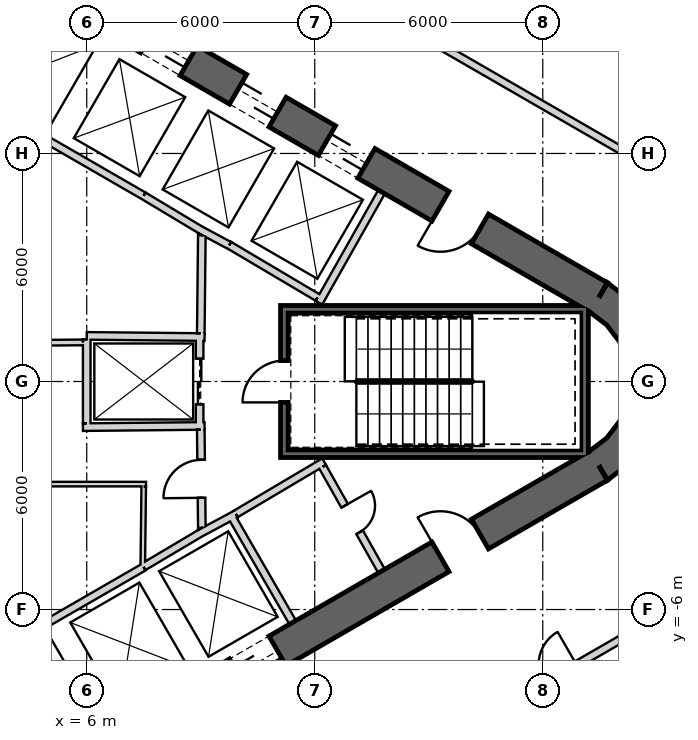
"""IFC4 building model, lengths in metres.
Left out: names, types, materials, properties, quantities, classifications, styles, units other than length and angle.
Written with IfcOpenShell. Run it as: python <this file> out.ifc"""

import sys

from ifc_helpers import new_model, si_unit, direction, frame, frame_2d, origin, place, context, subcontext, project, spatial, polyline, rectangle, outline, extrude, element, fill, save


model = new_model("IFC4")
c1 = context("Model", 3, precision=1e-05, world=origin(), true_north=direction((0.0, 1.0)))
c2 = subcontext(c1, "Body", "Model", "MODEL_VIEW")
j1 = project(units=[si_unit("LENGTHUNIT", "METRE"), si_unit("PLANEANGLEUNIT", "RADIAN")], contexts=[c1])
p1 = place(None, origin())
s1 = spatial("IfcSite", under=j1, at=p1, CompositionType="ELEMENT")
p2 = place(p1, origin())
s2 = spatial("IfcBuilding", under=s1, at=p2, CompositionType="ELEMENT")
p3 = place(p2, frame((0.0, 0.0, 82.4)))
s3 = spatial("IfcBuildingStorey", under=s2, at=p3, CompositionType="ELEMENT", Elevation=82.4)
p4 = place(p3, frame((19.475, 2.208, 0.0), z_axis=(0.0, 0.0, 1.0), x_axis=(-0.866028369851, 0.499994862586, 0.0)))
e1 = element("IfcWall", 1, at=p4, inside=s3, PredefinedType="SHEAR", context=c2, shape_type="SweptSolid", body=[
    extrude(rectangle(XDim=31.523, YDim=0.9, at=frame_2d((15.762, 0.0))), origin(), (0.0, 0.0, 1.0), 4.1),
])
p5 = place(p4, frame((7.062, 0.0, 0.0)))
e2 = element("IfcOpeningElement", 2, at=p5, cuts=e1, PredefinedType="OPENING", context=c2, shape_type="SweptSolid", body=[
    extrude(rectangle(XDim=1.2, YDim=2.4, at=frame_2d((0.6, 1.2))), frame((0.0, 0.46, 0.0), z_axis=(0.0, -1.0, 0.0), x_axis=(1.0, 0.0, 0.0)), (0.0, 0.0, 1.0), 0.92),
])
p6 = place(p4, frame((9.762, 0.0, 0.0)))
e3 = element("IfcOpeningElement", 3, at=p6, cuts=e1, PredefinedType="OPENING", context=c2, shape_type="SweptSolid", body=[
    extrude(rectangle(XDim=1.2, YDim=2.4, at=frame_2d((0.6, 1.2))), frame((0.0, 0.46, 0.0), z_axis=(0.0, -1.0, 0.0), x_axis=(1.0, 0.0, 0.0)), (0.0, 0.0, 1.0), 0.92),
])
p7 = place(p4, frame((12.462, 0.0, 0.0)))
e4 = element("IfcOpeningElement", 4, at=p7, cuts=e1, PredefinedType="OPENING", context=c2, shape_type="SweptSolid", body=[
    extrude(rectangle(XDim=1.2, YDim=2.4, at=frame_2d((0.6, 1.2))), frame((0.0, 0.46, 0.0), z_axis=(0.0, -1.0, 0.0), x_axis=(1.0, 0.0, 0.0)), (0.0, 0.0, 1.0), 0.92),
])
p8 = place(p4, frame((15.162, 0.0, 0.0)))
e5 = element("IfcOpeningElement", 5, at=p8, cuts=e1, PredefinedType="OPENING", context=c2, shape_type="SweptSolid", body=[
    extrude(rectangle(XDim=1.2, YDim=2.4, at=frame_2d((0.6, 1.2))), frame((0.0, 0.46, 0.0), z_axis=(0.0, -1.0, 0.0), x_axis=(1.0, 0.0, 0.0)), (0.0, 0.0, 1.0), 0.92),
])
p9 = place(p4, frame((17.862, 0.0, 0.0)))
e6 = element("IfcOpeningElement", 6, at=p9, cuts=e1, PredefinedType="OPENING", context=c2, shape_type="SweptSolid", body=[
    extrude(rectangle(XDim=1.2, YDim=2.4, at=frame_2d((0.6, 1.2))), frame((0.0, 0.46, 0.0), z_axis=(0.0, -1.0, 0.0), x_axis=(1.0, 0.0, 0.0)), (0.0, 0.0, 1.0), 0.92),
])
p10 = place(p4, frame((20.562, 0.0, 0.0)))
e7 = element("IfcOpeningElement", 7, at=p10, cuts=e1, PredefinedType="OPENING", context=c2, shape_type="SweptSolid", body=[
    extrude(rectangle(XDim=1.2, YDim=2.4, at=frame_2d((0.6, 1.2))), frame((0.0, 0.46, 0.0), z_axis=(0.0, -1.0, 0.0), x_axis=(1.0, 0.0, 0.0)), (0.0, 0.0, 1.0), 0.92),
])
p11 = place(p4, frame((23.262, 0.0, 0.0)))
e8 = element("IfcOpeningElement", 8, at=p11, cuts=e1, PredefinedType="OPENING", context=c2, shape_type="SweptSolid", body=[
    extrude(rectangle(XDim=1.2, YDim=2.4, at=frame_2d((0.6, 1.2))), frame((0.0, 0.46, 0.0), z_axis=(0.0, -1.0, 0.0), x_axis=(1.0, 0.0, 0.0)), (0.0, 0.0, 1.0), 0.92),
])
p12 = place(p4, frame((3.612, 0.0, 0.0)))
e9 = element("IfcOpeningElement", 9, at=p12, cuts=e1, PredefinedType="OPENING", context=c2, shape_type="SweptSolid", body=[
    extrude(rectangle(XDim=1.2, YDim=2.4, at=frame_2d((0.6, 1.2))), frame((0.0, 0.46, 0.0), z_axis=(0.0, -1.0, 0.0), x_axis=(1.0, 0.0, 0.0)), (0.0, 0.0, 1.0), 0.92),
])
p13 = place(p4, frame((26.712, 0.0, 0.0)))
e10 = element("IfcOpeningElement", 10, at=p13, cuts=e1, PredefinedType="OPENING", context=c2, shape_type="SweptSolid", body=[
    extrude(rectangle(XDim=1.2, YDim=2.4, at=frame_2d((0.6, 1.2))), frame((0.0, 0.46, 0.0), z_axis=(0.0, -1.0, 0.0), x_axis=(1.0, 0.0, 0.0)), (0.0, 0.0, 1.0), 0.92),
])
p14 = place(p3, frame((-7.825, -17.97, 0.0), z_axis=(0.0, 0.0, 1.0), x_axis=(0.866028369851, 0.499994862586, 0.0)))
e11 = element("IfcWall", 11, at=p14, inside=s3, PredefinedType="SHEAR", context=c2, shape_type="SweptSolid", body=[
    extrude(rectangle(XDim=31.523, YDim=0.9, at=frame_2d((15.762, 0.0))), origin(), (0.0, 0.0, 1.0), 4.1),
])
p15 = place(p14, frame((7.062, 0.0, 0.0)))
e12 = element("IfcOpeningElement", 12, at=p15, cuts=e11, PredefinedType="OPENING", context=c2, shape_type="SweptSolid", body=[
    extrude(rectangle(XDim=1.2, YDim=2.4, at=frame_2d((0.6, 1.2))), frame((0.0, 0.46, 0.0), z_axis=(0.0, -1.0, 0.0), x_axis=(1.0, 0.0, 0.0)), (0.0, 0.0, 1.0), 0.92),
])
p16 = place(p14, frame((9.762, 0.0, 0.0)))
e13 = element("IfcOpeningElement", 13, at=p16, cuts=e11, PredefinedType="OPENING", context=c2, shape_type="SweptSolid", body=[
    extrude(rectangle(XDim=1.2, YDim=2.4, at=frame_2d((0.6, 1.2))), frame((0.0, 0.46, 0.0), z_axis=(0.0, -1.0, 0.0), x_axis=(1.0, 0.0, 0.0)), (0.0, 0.0, 1.0), 0.92),
])
p17 = place(p14, frame((12.462, 0.0, 0.0)))
e14 = element("IfcOpeningElement", 14, at=p17, cuts=e11, PredefinedType="OPENING", context=c2, shape_type="SweptSolid", body=[
    extrude(rectangle(XDim=1.2, YDim=2.4, at=frame_2d((0.6, 1.2))), frame((0.0, 0.46, 0.0), z_axis=(0.0, -1.0, 0.0), x_axis=(1.0, 0.0, 0.0)), (0.0, 0.0, 1.0), 0.92),
])
p18 = place(p14, frame((15.162, 0.0, 0.0)))
e15 = element("IfcOpeningElement", 15, at=p18, cuts=e11, PredefinedType="OPENING", context=c2, shape_type="SweptSolid", body=[
    extrude(rectangle(XDim=1.2, YDim=2.4, at=frame_2d((0.6, 1.2))), frame((0.0, 0.46, 0.0), z_axis=(0.0, -1.0, 0.0), x_axis=(1.0, 0.0, 0.0)), (0.0, 0.0, 1.0), 0.92),
])
p19 = place(p14, frame((17.862, 0.0, 0.0)))
e16 = element("IfcOpeningElement", 16, at=p19, cuts=e11, PredefinedType="OPENING", context=c2, shape_type="SweptSolid", body=[
    extrude(rectangle(XDim=1.2, YDim=2.4, at=frame_2d((0.6, 1.2))), frame((0.0, 0.46, 0.0), z_axis=(0.0, -1.0, 0.0), x_axis=(1.0, 0.0, 0.0)), (0.0, 0.0, 1.0), 0.92),
])
p20 = place(p14, frame((20.562, 0.0, 0.0)))
e17 = element("IfcOpeningElement", 17, at=p20, cuts=e11, PredefinedType="OPENING", context=c2, shape_type="SweptSolid", body=[
    extrude(rectangle(XDim=1.2, YDim=2.4, at=frame_2d((0.6, 1.2))), frame((0.0, 0.46, 0.0), z_axis=(0.0, -1.0, 0.0), x_axis=(1.0, 0.0, 0.0)), (0.0, 0.0, 1.0), 0.92),
])
p21 = place(p14, frame((26.712, 0.0, 0.0)))
e18 = element("IfcOpeningElement", 18, at=p21, cuts=e11, PredefinedType="OPENING", context=c2, shape_type="SweptSolid", body=[
    extrude(rectangle(XDim=1.2, YDim=2.4, at=frame_2d((0.6, 1.2))), frame((0.0, 0.46, 0.0), z_axis=(0.0, -1.0, 0.0), x_axis=(1.0, 0.0, 0.0)), (0.0, 0.0, 1.0), 0.92),
])
p22 = place(p14, frame((3.612, 0.0, 0.0)))
e19 = element("IfcOpeningElement", 19, at=p22, cuts=e11, PredefinedType="OPENING", context=c2, shape_type="SweptSolid", body=[
    extrude(rectangle(XDim=1.2, YDim=2.4, at=frame_2d((0.6, 1.2))), frame((0.0, 0.46, 0.0), z_axis=(0.0, -1.0, 0.0), x_axis=(1.0, 0.0, 0.0)), (0.0, 0.0, 1.0), 0.92),
])
p23 = place(p3, origin())
e20 = element("IfcWall", 20, at=p23, inside=s3, PredefinedType="SHEAR", context=c2, shape_type="SweptSolid", body=[
    extrude(outline(polyline([(19.7, -2.598), (20.321, -2.121), (20.798, -1.5), (21.098, -0.777), (21.2, 0.0), (21.098, 0.777), (20.798, 1.5), (20.321, 2.121), (19.7, 2.598), (19.25, 1.819), (19.685, 1.485), (20.019, 1.05), (20.229, 0.543), (20.3, 0.0), (20.229, -0.543), (20.019, -1.05), (19.685, -1.485), (19.25, -1.819), (19.7, -2.598)])), origin(), (0.0, 0.0, 1.0), 4.1),
])
p24 = place(p3, frame((7.497, 4.886, 0.0), z_axis=(0.0, 0.0, 1.0), x_axis=(-0.866030989016, 0.499990325971, 0.0)))
e21 = element("IfcWall", 21, at=p24, inside=s3, PredefinedType="PLUMBINGWALL", context=c2, shape_type="SweptSolid", body=[
    extrude(rectangle(XDim=8.1, YDim=0.2, at=frame_2d((4.05, 0.0))), origin(), (0.0, 0.0, 1.0), 3.8),
])
p25 = place(p3, frame((12.11, 2.073, 0.0), z_axis=(0.0, 0.0, 1.0), x_axis=(0.49196600604, 0.870614408852, 0.0)))
e22 = element("IfcWall", 22, at=p25, inside=s3, PredefinedType="PLUMBINGWALL", context=c2, shape_type="SweptSolid", body=[
    extrude(rectangle(XDim=3.35, YDim=0.2, at=frame_2d((1.675, 0.0))), origin(), (0.0, 0.0, 1.0), 3.8),
])
p26 = place(p3, frame((12.073, 2.211, 0.0), z_axis=(0.0, 0.0, 1.0), x_axis=(-0.860438357912, 0.509554542943, 0.0)))
e23 = element("IfcWall", 23, at=p26, inside=s3, PredefinedType="PLUMBINGWALL", context=c2, shape_type="SweptSolid", body=[
    extrude(rectangle(XDim=2.7, YDim=0.2, at=frame_2d((1.35, 0.0))), origin(), (0.0, 0.0, 1.0), 3.8),
])
p27 = place(p3, frame((9.748, 3.583, 0.0), z_axis=(0.0, 0.0, 1.0), x_axis=(-0.880917147855, 0.473270513147, 0.0)))
e24 = element("IfcWall", 24, at=p27, inside=s3, PredefinedType="PLUMBINGWALL", context=c2, shape_type="SweptSolid", body=[
    extrude(rectangle(XDim=0.878, YDim=0.2, at=frame_2d((0.439, 0.0))), origin(), (0.0, 0.0, 1.0), 3.8),
])
p28 = place(p3, frame((9.079, 3.937, 0.0), z_axis=(0.0, 0.0, 1.0), x_axis=(-0.857516281273, 0.51445682749, 0.0)))
e25 = element("IfcWall", 25, at=p28, inside=s3, PredefinedType="PLUMBINGWALL", context=c2, shape_type="SweptSolid", body=[
    extrude(rectangle(XDim=1.845, YDim=0.2, at=frame_2d((0.922, 0.0))), origin(), (0.0, 0.0, 1.0), 3.8),
])
p29 = place(p3, frame((0.483, -8.936, 0.0), z_axis=(0.0, 0.0, 1.0), x_axis=(0.866030989016, 0.499990325971, 0.0)))
e26 = element("IfcWall", 26, at=p29, inside=s3, PredefinedType="PLUMBINGWALL", context=c2, shape_type="SweptSolid", body=[
    extrude(rectangle(XDim=8.1, YDim=0.2, at=frame_2d((4.05, 0.0))), origin(), (0.0, 0.0, 1.0), 3.8),
])
p30 = place(p3, frame((9.795, -3.525, 0.0), z_axis=(0.0, 0.0, 1.0), x_axis=(0.499984717929, -0.866034226713, 0.0)))
e27 = element("IfcWall", 27, at=p30, inside=s3, PredefinedType="PLUMBINGWALL", context=c2, shape_type="SweptSolid", body=[
    extrude(rectangle(XDim=3.25, YDim=0.2, at=frame_2d((1.625, 0.0))), origin(), (0.0, 0.0, 1.0), 3.8),
])
p31 = place(p3, frame((8.974, -3.999, 0.0), z_axis=(0.0, 0.0, 1.0), x_axis=(0.880907015104, 0.473289373154, 0.0)))
e28 = element("IfcWall", 28, at=p31, inside=s3, PredefinedType="PLUMBINGWALL", context=c2, shape_type="SweptSolid", body=[
    extrude(rectangle(XDim=1.078, YDim=0.2, at=frame_2d((0.539, 0.0))), origin(), (0.0, 0.0, 1.0), 3.8),
])
p32 = place(p3, frame((7.493, -4.878, 0.0), z_axis=(0.0, 0.0, 1.0), x_axis=(0.859981807212, 0.510324691999, 0.0)))
e29 = element("IfcWall", 29, at=p32, inside=s3, PredefinedType="PLUMBINGWALL", context=c2, shape_type="SweptSolid", body=[
    extrude(rectangle(XDim=1.845, YDim=0.2, at=frame_2d((0.922, 0.0))), origin(), (0.0, 0.0, 1.0), 3.8),
])
p33 = place(p3, frame((19.2, 1.9, -0.3), z_axis=(0.0, 0.0, 1.0), x_axis=(-1.0, 0.0, 0.0)))
e30 = element("IfcWall", 30, at=p33, inside=s3, PredefinedType="SHEAR", context=c2, shape_type="SweptSolid", body=[
    extrude(rectangle(XDim=8.1, YDim=0.2, at=frame_2d((4.05, 0.0))), origin(), (0.0, 0.0, 1.0), 4.1),
])
p34 = place(p3, frame((19.1, -2.0, -0.3), z_axis=(0.0, 0.0, 1.0), x_axis=(0.0, 1.0, 0.0)))
e31 = element("IfcWall", 31, at=p34, inside=s3, PredefinedType="SHEAR", context=c2, shape_type="SweptSolid", body=[
    extrude(rectangle(XDim=3.8, YDim=0.2, at=frame_2d((1.9, 0.0))), origin(), (0.0, 0.0, 1.0), 4.1),
])
p35 = place(p3, frame((11.1, -1.9, -0.3), z_axis=(0.0, 0.0, 1.0), x_axis=(1.0, 0.0, 0.0)))
e32 = element("IfcWall", 32, at=p35, inside=s3, PredefinedType="SHEAR", context=c2, shape_type="SweptSolid", body=[
    extrude(rectangle(XDim=7.9, YDim=0.2, at=frame_2d((3.95, 0.0))), origin(), (0.0, 0.0, 1.0), 4.1),
])
p36 = place(p3, frame((11.2, -1.8, -0.3), z_axis=(0.0, 0.0, 1.0), x_axis=(0.0, 1.0, 0.0)))
e33 = element("IfcWall", 33, at=p36, inside=s3, PredefinedType="SHEAR", context=c2, shape_type="SweptSolid", body=[
    extrude(rectangle(XDim=3.6, YDim=0.2, at=frame_2d((1.8, 0.0))), origin(), (0.0, 0.0, 1.0), 4.1),
])
p37 = place(p36, frame((1.25, 0.0, 0.3)))
e34 = element("IfcOpeningElement", 34, at=p37, cuts=e33, PredefinedType="OPENING", context=c2, shape_type="SweptSolid", body=[
    extrude(rectangle(XDim=1.1, YDim=2.1, at=frame_2d((0.55, 1.05))), frame((0.0, 0.11, 0.0), z_axis=(0.0, -1.0, 0.0), x_axis=(1.0, 0.0, 0.0)), (0.0, 0.0, 1.0), 0.22),
])
p38 = place(p3, frame((8.97, 1.2, 0.0), z_axis=(0.0, 0.0, 1.0), x_axis=(0.0, -1.0, 0.0)))
e35 = element("IfcWall", 35, at=p38, inside=s3, PredefinedType="PLUMBINGWALL", context=c2, shape_type="SweptSolid", body=[
    extrude(rectangle(XDim=2.4, YDim=0.2, at=frame_2d((1.2, 0.0))), origin(), (0.0, 0.0, 1.0), 3.8),
])
p39 = place(p38, frame((0.6, 0.0, 0.0)))
e36 = element("IfcOpeningElement", 36, at=p39, cuts=e35, PredefinedType="OPENING", context=c2, shape_type="SweptSolid", body=[
    extrude(rectangle(XDim=1.2, YDim=2.4, at=frame_2d((0.6, 1.2))), frame((0.0, 0.11, 0.0), z_axis=(0.0, -1.0, 0.0), x_axis=(1.0, 0.0, 0.0)), (0.0, 0.0, 1.0), 0.22),
])
p40 = place(p3, frame((6.0, 1.2, 0.0), z_axis=(0.0, 0.0, 1.0), x_axis=(0.999949988, -0.010001074852, 0.0)))
e37 = element("IfcWall", 37, at=p40, inside=s3, PredefinedType="PLUMBINGWALL", context=c2, shape_type="SweptSolid", body=[
    extrude(rectangle(XDim=3.1, YDim=0.2, at=frame_2d((1.55, 0.0))), origin(), (0.0, 0.0, 1.0), 3.8),
])
p41 = place(p3, frame((5.9, -1.201, 0.0), z_axis=(0.0, 0.0, 1.0), x_axis=(0.999950064753, 0.009993397809, 0.0)))
e38 = element("IfcWall", 38, at=p41, inside=s3, PredefinedType="PLUMBINGWALL", context=c2, shape_type="SweptSolid", body=[
    extrude(rectangle(XDim=3.2, YDim=0.2, at=frame_2d((1.6, 0.0))), origin(), (0.0, 0.0, 1.0), 3.8),
])
p42 = place(p3, frame((6.0, -1.1, 0.0), z_axis=(0.0, 0.0, 1.0), x_axis=(0.0, 1.0, 0.0)))
e39 = element("IfcWall", 39, at=p42, inside=s3, PredefinedType="PLUMBINGWALL", context=c2, shape_type="SweptSolid", body=[
    extrude(rectangle(XDim=2.205, YDim=0.2, at=frame_2d((1.102, 0.0))), origin(), (0.0, 0.0, 1.0), 3.8),
])
p43 = place(p3, frame((12.245, -2.109, 0.0), z_axis=(0.0, 0.0, 1.0), x_axis=(-0.860414880418, -0.509594185166, 0.0)))
e40 = element("IfcWall", 40, at=p43, inside=s3, PredefinedType="PARTITIONING", context=c2, shape_type="SweptSolid", body=[
    extrude(rectangle(XDim=2.7, YDim=0.2, at=frame_2d((1.35, 0.0))), origin(), (0.0, 0.0, 1.0), 3.8),
])
p44 = place(p3, frame((13.758, -4.99, 0.0), z_axis=(0.0, 0.0, 1.0), x_axis=(-0.491993409184, 0.87059892334, 0.0)))
e41 = element("IfcWall", 41, at=p44, inside=s3, PredefinedType="PARTITIONING", context=c2, shape_type="SweptSolid", body=[
    extrude(rectangle(XDim=3.15, YDim=0.2, at=frame_2d((1.575, 0.0))), origin(), (0.0, 0.0, 1.0), 3.8),
])
p45 = place(p44, frame((1.175, 0.0, 0.0)))
e42 = element("IfcOpeningElement", 42, at=p45, cuts=e41, PredefinedType="OPENING", context=c2, shape_type="SweptSolid", body=[
    extrude(rectangle(XDim=0.8, YDim=2.1, at=frame_2d((0.4, 1.05))), frame((0.0, 0.11, 0.0), z_axis=(0.0, -1.0, 0.0), x_axis=(1.0, 0.0, 0.0)), (0.0, 0.0, 1.0), 0.22),
])
p46 = place(p3, frame((9.001, 1.27, 0.0), z_axis=(0.0, 0.0, 1.0), x_axis=(0.010784614026, 0.999941844359, 0.0)))
e43 = element("IfcWall", 43, at=p46, inside=s3, PredefinedType="PARTITIONING", context=c2, shape_type="SweptSolid", body=[
    extrude(rectangle(XDim=2.581, YDim=0.2, at=frame_2d((1.291, 0.0))), origin(), (0.0, 0.0, 1.0), 3.8),
])
p47 = place(p3, frame((9.029, -3.851, 0.0), z_axis=(0.0, 0.0, 1.0), x_axis=(-0.010783593937, 0.99994185536, 0.0)))
e44 = element("IfcWall", 44, at=p47, inside=s3, PredefinedType="PARTITIONING", context=c2, shape_type="SweptSolid", body=[
    extrude(rectangle(XDim=2.581, YDim=0.2, at=frame_2d((1.291, 0.0))), origin(), (0.0, 0.0, 1.0), 3.8),
])
p48 = place(p47, frame((0.791, 0.0, 0.0)))
e45 = element("IfcOpeningElement", 45, at=p48, cuts=e44, PredefinedType="OPENING", context=c2, shape_type="SweptSolid", body=[
    extrude(rectangle(XDim=1.0, YDim=2.1, at=frame_2d((0.5, 1.05))), frame((0.0, 0.11, 0.0), z_axis=(0.0, -1.0, 0.0), x_axis=(1.0, 0.0, 0.0)), (0.0, 0.0, 1.0), 0.22),
])
p49 = place(p3, frame((2.384, 0.999, 0.0), z_axis=(0.0, 0.0, 1.0), x_axis=(0.999964703434, 0.008401897723, 0.0)))
e46 = element("IfcWall", 46, at=p49, inside=s3, PredefinedType="PLUMBINGWALL", context=c2, shape_type="SweptSolid", body=[
    extrude(rectangle(XDim=3.516, YDim=0.15, at=frame_2d((1.758, 0.0))), origin(), (0.0, 0.0, 1.0), 3.8),
])
p50 = place(p49, frame((1.422, 0.0, 0.0)))
e47 = element("IfcOpeningElement", 47, at=p50, cuts=e46, PredefinedType="OPENING", context=c2, shape_type="SweptSolid", body=[
    extrude(rectangle(XDim=0.8, YDim=2.1, at=frame_2d((0.4, 1.05))), frame((0.0, 0.085, 0.0), z_axis=(0.0, -1.0, 0.0), x_axis=(1.0, 0.0, 0.0)), (0.0, 0.0, 1.0), 0.17),
])
p51 = place(p3, frame((7.56, -2.7, 0.0), z_axis=(0.0, 0.0, 1.0), x_axis=(-1.0, 0.0, 0.0)))
e48 = element("IfcWall", 48, at=p51, inside=s3, PredefinedType="PARTITIONING", context=c2, shape_type="SweptSolid", body=[
    extrude(rectangle(XDim=3.0, YDim=0.12, at=frame_2d((1.5, 0.0))), origin(), (0.0, 0.0, 1.0), 3.8),
])
p52 = place(p3, frame((7.475, -4.865, 0.0), z_axis=(0.0, 0.0, 1.0), x_axis=(0.011716133148, 0.999931363757, 0.0)))
e49 = element("IfcWall", 49, at=p52, inside=s3, PredefinedType="PARTITIONING", context=c2, shape_type="SweptSolid", body=[
    extrude(rectangle(XDim=2.105, YDim=0.12, at=frame_2d((1.052, 0.0))), origin(), (0.0, 0.0, 1.0), 3.8),
])
p53 = place(p3, frame((21.944, 4.998, 0.0), z_axis=(0.0, 0.0, 1.0), x_axis=(-0.866025615729, 0.499999632902, 0.0)))
e50 = element("IfcWall", 50, at=p53, inside=s3, PredefinedType="PARTITIONING", context=c2, shape_type="SweptSolid", body=[
    extrude(rectangle(XDim=32.811, YDim=0.2, at=frame_2d((16.405, 0.0))), origin(), (0.0, 0.0, 1.0), 2.98),
])
p54 = place(p53, frame((15.955, 0.0, 0.0)))
e51 = element("IfcOpeningElement", 51, at=p54, cuts=e50, PredefinedType="OPENING", context=c2, shape_type="SweptSolid", body=[
    extrude(rectangle(XDim=1.0, YDim=2.1, at=frame_2d((0.5, 1.05))), frame((0.0, 0.11, 0.0), z_axis=(0.0, -1.0, 0.0), x_axis=(1.0, 0.0, 0.0)), (0.0, 0.0, 1.0), 0.22),
])
p55 = place(p3, frame((14.751, -9.843, 0.0), z_axis=(0.0, 0.0, 1.0), x_axis=(0.866018824381, 0.500011395688, 0.0)))
e52 = element("IfcWall", 52, at=p55, inside=s3, PredefinedType="PARTITIONING", context=c2, shape_type="SweptSolid", body=[
    extrude(rectangle(XDim=8.557, YDim=0.2, at=frame_2d((4.279, 0.0))), origin(), (0.0, 0.0, 1.0), 2.98),
])
p56 = place(p55, frame((3.779, 0.0, 0.0)))
e53 = element("IfcOpeningElement", 53, at=p56, cuts=e52, PredefinedType="OPENING", context=c2, shape_type="SweptSolid", body=[
    extrude(rectangle(XDim=1.0, YDim=2.1, at=frame_2d((0.5, 1.05))), frame((0.0, 0.11, 0.0), z_axis=(0.0, -1.0, 0.0), x_axis=(1.0, 0.0, 0.0)), (0.0, 0.0, 1.0), 0.22),
])
p57 = place(p37, origin())
e54 = element("IfcDoor", 54, at=p57, inside=s3, OperationType="SINGLE_SWING_RIGHT", PredefinedType="USERDEFINED", context=c2, shape_type="SweptSolid", body=[
    extrude(rectangle(XDim=1.1, YDim=2.1, at=frame_2d((0.55, 1.05))), frame((0.0, 0.025, 0.0), z_axis=(0.0, -1.0, 0.0), x_axis=(1.0, 0.0, 0.0)), (0.0, 0.0, 1.0), 0.05),
])
fill(e34, e54)
p58 = place(p48, origin())
e55 = element("IfcDoor", 55, at=p58, inside=s3, OperationType="SINGLE_SWING_LEFT", PredefinedType="USERDEFINED", context=c2, shape_type="SweptSolid", body=[
    extrude(rectangle(XDim=1.0, YDim=2.1, at=frame_2d((0.5, 1.05))), frame((0.0, 0.025, 0.0), z_axis=(0.0, -1.0, 0.0), x_axis=(1.0, 0.0, 0.0)), (0.0, 0.0, 1.0), 0.05),
])
fill(e45, e55)
p59 = place(p39, origin())
e56 = element("IfcDoor", 56, at=p59, inside=s3, OperationType="SLIDING_TO_LEFT", PredefinedType="USERDEFINED", context=c2, shape_type="SweptSolid", body=[
    extrude(rectangle(XDim=1.2, YDim=2.4, at=frame_2d((0.6, 1.2))), frame((0.0, 0.025, 0.0), z_axis=(0.0, -1.0, 0.0), x_axis=(1.0, 0.0, 0.0)), (0.0, 0.0, 1.0), 0.05),
])
fill(e36, e56)
p60 = place(p45, origin())
e57 = element("IfcDoor", 57, at=p60, inside=s3, OperationType="SINGLE_SWING_RIGHT", PredefinedType="USERDEFINED", context=c2, shape_type="SweptSolid", body=[
    extrude(rectangle(XDim=0.8, YDim=2.1, at=frame_2d((0.4, 1.05))), frame((0.0, 0.025, 0.0), z_axis=(0.0, -1.0, 0.0), x_axis=(1.0, 0.0, 0.0)), (0.0, 0.0, 1.0), 0.05),
])
fill(e42, e57)
p61 = place(p5, origin())
e58 = element("IfcDoor", 58, at=p61, inside=s3, OperationType="SLIDING_TO_LEFT", PredefinedType="USERDEFINED", context=c2, shape_type="SweptSolid", body=[
    extrude(rectangle(XDim=1.2, YDim=2.4, at=frame_2d((0.6, 1.2))), frame((0.0, 0.025, 0.0), z_axis=(0.0, -1.0, 0.0), x_axis=(1.0, 0.0, 0.0)), (0.0, 0.0, 1.0), 0.05),
])
fill(e2, e58)
p62 = place(p6, origin())
e59 = element("IfcDoor", 59, at=p62, inside=s3, OperationType="SLIDING_TO_LEFT", PredefinedType="USERDEFINED", context=c2, shape_type="SweptSolid", body=[
    extrude(rectangle(XDim=1.2, YDim=2.4, at=frame_2d((0.6, 1.2))), frame((0.0, 0.025, 0.0), z_axis=(0.0, -1.0, 0.0), x_axis=(1.0, 0.0, 0.0)), (0.0, 0.0, 1.0), 0.05),
])
fill(e3, e59)
p63 = place(p7, origin())
e60 = element("IfcDoor", 60, at=p63, inside=s3, OperationType="SLIDING_TO_LEFT", PredefinedType="USERDEFINED", context=c2, shape_type="SweptSolid", body=[
    extrude(rectangle(XDim=1.2, YDim=2.4, at=frame_2d((0.6, 1.2))), frame((0.0, 0.025, 0.0), z_axis=(0.0, -1.0, 0.0), x_axis=(1.0, 0.0, 0.0)), (0.0, 0.0, 1.0), 0.05),
])
fill(e4, e60)
p64 = place(p20, origin())
e61 = element("IfcDoor", 61, at=p64, inside=s3, OperationType="SLIDING_TO_LEFT", PredefinedType="USERDEFINED", context=c2, shape_type="SweptSolid", body=[
    extrude(rectangle(XDim=1.2, YDim=2.4, at=frame_2d((0.6, 1.2))), frame((0.0, 0.025, 0.0), z_axis=(0.0, -1.0, 0.0), x_axis=(1.0, 0.0, 0.0)), (0.0, 0.0, 1.0), 0.05),
])
fill(e17, e61)
p65 = place(p21, origin())
e62 = element("IfcDoor", 62, at=p65, inside=s3, OperationType="SINGLE_SWING_RIGHT", PredefinedType="USERDEFINED", context=c2, shape_type="SweptSolid", body=[
    extrude(rectangle(XDim=1.2, YDim=2.4, at=frame_2d((0.6, 1.2))), frame((0.0, 0.025, 0.0), z_axis=(0.0, -1.0, 0.0), x_axis=(1.0, 0.0, 0.0)), (0.0, 0.0, 1.0), 0.05),
])
fill(e18, e62)
p66 = place(p12, origin())
e63 = element("IfcDoor", 63, at=p66, inside=s3, OperationType="SINGLE_SWING_LEFT", PredefinedType="USERDEFINED", context=c2, shape_type="SweptSolid", body=[
    extrude(rectangle(XDim=1.2, YDim=2.4, at=frame_2d((0.6, 1.2))), frame((0.0, 0.025, 0.0), z_axis=(0.0, -1.0, 0.0), x_axis=(1.0, 0.0, 0.0)), (0.0, 0.0, 1.0), 0.05),
])
fill(e9, e63)
save(model, sys.argv[1])
